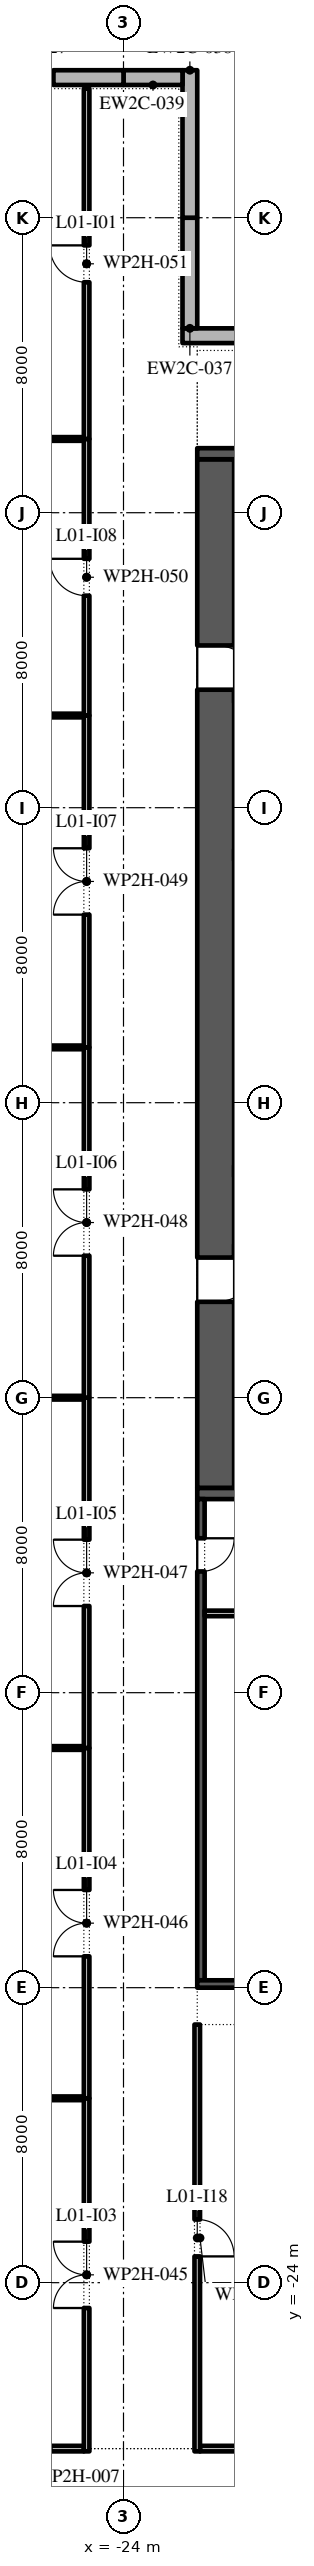
"""IFC4 building model, lengths in metres.
Left out: names, types, materials, properties, quantities, classifications, styles, units other than length and angle.
Written with IfcOpenShell. Run it as: python <this file> out.ifc"""

import sys

from ifc_helpers import new_model, si_unit, direction, frame, frame_2d, origin, place, context, subcontext, project, spatial, polyline, rectangle, outline, extrude, element, fill, save


model = new_model("IFC4")
c1 = context("Model", 3, precision=1e-05, world=origin(), true_north=direction((0.0, 1.0)))
c2 = subcontext(c1, "Body", "Model", "MODEL_VIEW")
j1 = project(units=[si_unit("LENGTHUNIT", "METRE"), si_unit("PLANEANGLEUNIT", "RADIAN")], contexts=[c1])
p1 = place(None, origin())
s1 = spatial("IfcSite", under=j1, at=p1, CompositionType="ELEMENT")
p2 = place(p1, origin())
s2 = spatial("IfcBuilding", under=s1, at=p2, CompositionType="ELEMENT")
p3 = place(p2, frame((0.0, 0.0, 8.0)))
s3 = spatial("IfcBuildingStorey", under=s2, at=p3, CompositionType="ELEMENT", Elevation=8.0)
p4 = place(p3, frame((-16.0, 28.8, 0.0), z_axis=(0.0, 0.0, 1.0), x_axis=(-1.0, 0.0, 0.0)))
e1 = element("IfcWall", 1, at=p4, inside=s3, PredefinedType="STANDARD", context=c2, shape_type="SweptSolid", body=[
    extrude(rectangle(XDim=6.4, YDim=0.4, at=frame_2d((3.2, 0.0))), origin(), (0.0, 0.0, 1.0), 5.7),
])
p5 = place(p3, frame((-22.2, 29.0, 0.0), z_axis=(0.0, 0.0, 1.0), x_axis=(0.0, 1.0, 0.0)))
e2 = element("IfcWall", 2, at=p5, inside=s3, PredefinedType="STANDARD", context=c2, shape_type="SweptSolid", body=[
    extrude(rectangle(XDim=3.0, YDim=0.4, at=frame_2d((1.5, 0.0))), origin(), (0.0, 0.0, 1.0), 5.7),
])
p6 = place(p3, frame((-22.2, 32.0, 0.0), z_axis=(0.0, 0.0, 1.0), x_axis=(0.0, 1.0, 0.0)))
e3 = element("IfcWall", 3, at=p6, inside=s3, PredefinedType="STANDARD", context=c2, shape_type="SweptSolid", body=[
    extrude(rectangle(XDim=4.0, YDim=0.4, at=frame_2d((2.0, 0.0))), origin(), (0.0, 0.0, 1.0), 5.7),
])
p7 = place(p3, frame((-22.4, 35.8, 0.0), z_axis=(0.0, 0.0, 1.0), x_axis=(-1.0, 0.0, 0.0)))
e4 = element("IfcWall", 4, at=p7, inside=s3, PredefinedType="STANDARD", context=c2, shape_type="SweptSolid", body=[
    extrude(rectangle(XDim=1.6, YDim=0.4, at=frame_2d((0.8, 0.0))), origin(), (0.0, 0.0, 1.0), 5.7),
])
p8 = place(p3, frame((-24.0, 35.8, 0.0), z_axis=(0.0, 0.0, 1.0), x_axis=(-1.0, 0.0, 0.0)))
e5 = element("IfcWall", 5, at=p8, inside=s3, PredefinedType="STANDARD", context=c2, shape_type="SweptSolid", body=[
    extrude(rectangle(XDim=8.0, YDim=0.4, at=frame_2d((4.0, 0.0))), origin(), (0.0, 0.0, 1.0), 5.7),
])
p9 = place(p8, frame((1.9, 0.0, 0.9)))
e6 = element("IfcOpeningElement", 6, at=p9, cuts=e5, PredefinedType="OPENING", context=c2, shape_type="SweptSolid", body=[
    extrude(outline(polyline([(0.0, 0.0), (1.8, 0.0), (1.8, 2.641), (1.785, 2.876), (1.739, 3.107), (1.663, 3.33), (1.559, 3.541), (1.428, 3.737), (1.273, 3.914), (1.096, 4.069), (0.9, 4.2), (0.704, 4.069), (0.527, 3.914), (0.372, 3.737), (0.241, 3.541), (0.137, 3.33), (0.061, 3.107), (0.015, 2.876), (0.0, 2.641), (0.0, 0.0)])), frame((0.0, 0.21, 0.0), z_axis=(0.0, -1.0, 0.0), x_axis=(1.0, 0.0, 0.0)), (0.0, 0.0, 1.0), 0.42),
])
p10 = place(p8, frame((4.3, 0.0, 0.9)))
e7 = element("IfcOpeningElement", 7, at=p10, cuts=e5, PredefinedType="OPENING", context=c2, shape_type="SweptSolid", body=[
    extrude(outline(polyline([(0.0, 0.0), (1.8, 0.0), (1.8, 2.641), (1.785, 2.876), (1.739, 3.107), (1.663, 3.33), (1.559, 3.541), (1.428, 3.737), (1.273, 3.914), (1.096, 4.069), (0.9, 4.2), (0.704, 4.069), (0.527, 3.914), (0.372, 3.737), (0.241, 3.541), (0.137, 3.33), (0.061, 3.107), (0.015, 2.876), (0.0, 2.641), (0.0, 0.0)])), frame((0.0, 0.21, 0.0), z_axis=(0.0, -1.0, 0.0), x_axis=(1.0, 0.0, 0.0)), (0.0, 0.0, 1.0), 0.42),
])
p11 = place(p3, frame((-21.5, -2.45, 0.0), z_axis=(0.0, 0.0, 1.0), x_axis=(0.0, 1.0, 0.0)))
e8 = element("IfcWall", 8, at=p11, inside=s3, PredefinedType="SHEAR", context=c2, shape_type="SweptSolid", body=[
    extrude(rectangle(XDim=27.9, YDim=1.0, at=frame_2d((13.95, 0.0))), origin(), (0.0, 0.0, 1.0), 5.7),
])
p12 = place(p11, frame((5.05, 0.0, 0.0)))
e9 = element("IfcOpeningElement", 9, at=p12, cuts=e8, PredefinedType="OPENING", context=c2, shape_type="SweptSolid", body=[
    extrude(rectangle(XDim=1.2, YDim=2.1, at=frame_2d((0.6, 1.05))), frame((0.0, 0.51, 0.0), z_axis=(0.0, -1.0, 0.0), x_axis=(1.0, 0.0, 0.0)), (0.0, 0.0, 1.0), 1.02),
])
p13 = place(p11, frame((21.65, 0.0, 0.0)))
e10 = element("IfcOpeningElement", 10, at=p13, cuts=e8, PredefinedType="OPENING", context=c2, shape_type="SweptSolid", body=[
    extrude(rectangle(XDim=1.2, YDim=2.1, at=frame_2d((0.6, 1.05))), frame((0.0, 0.51, 0.0), z_axis=(0.0, -1.0, 0.0), x_axis=(1.0, 0.0, 0.0)), (0.0, 0.0, 1.0), 1.02),
])
for number, where, z_axis, x_axis in (
    (11, (-22.0, -2.6, 0.0), (0.0, 0.0, 1.0), (1.0, 0.0, 0.0)),
    (12, (-22.0, 25.6, 0.0), (0.0, 0.0, 1.0), (1.0, 0.0, 0.0)),
):
    element("IfcWall", number, at=place(p3, frame(where, z_axis=z_axis, x_axis=x_axis)), inside=s3, PredefinedType="SHEAR", context=c2, shape_type="SweptSolid", body=[
        extrude(rectangle(XDim=12.0, YDim=0.3, at=frame_2d((6.0, 0.0))), origin(), (0.0, 0.0, 1.0), 5.7),
    ])
p14 = place(p3, frame((-21.9, -15.8, 0.0), z_axis=(0.0, 0.0, 1.0), x_axis=(0.0, 1.0, 0.0)))
e13 = element("IfcWall", 13, at=p14, inside=s3, PredefinedType="SHEAR", context=c2, shape_type="SweptSolid", body=[
    extrude(rectangle(XDim=13.05, YDim=0.2, at=frame_2d((6.525, 0.0))), origin(), (0.0, 0.0, 1.0), 5.7),
])
p15 = place(p14, frame((11.087, 0.0, 0.0)))
e14 = element("IfcOpeningElement", 14, at=p15, cuts=e13, PredefinedType="OPENING", context=c2, shape_type="SweptSolid", body=[
    extrude(rectangle(XDim=0.9, YDim=2.1, at=frame_2d((0.45, 1.05))), frame((0.0, 0.11, 0.0), z_axis=(0.0, -1.0, 0.0), x_axis=(1.0, 0.0, 0.0)), (0.0, 0.0, 1.0), 0.22),
])
p16 = place(p3, frame((-22.0, -15.9, 0.0), z_axis=(0.0, 0.0, 1.0), x_axis=(1.0, 0.0, 0.0)))
e15 = element("IfcWall", 15, at=p16, inside=s3, PredefinedType="SHEAR", context=c2, shape_type="SweptSolid", body=[
    extrude(rectangle(XDim=12.0, YDim=0.2, at=frame_2d((6.0, 0.0))), origin(), (0.0, 0.0, 1.0), 5.7),
])
p17 = place(p3, frame((-21.8, -5.85, 0.0), z_axis=(0.0, 0.0, 1.0), x_axis=(1.0, 0.0, 0.0)))
e16 = element("IfcWall", 16, at=p17, inside=s3, PredefinedType="PARTITIONING", context=c2, shape_type="SweptSolid", body=[
    extrude(rectangle(XDim=11.6, YDim=0.15, at=frame_2d((5.8, 0.0))), origin(), (0.0, 0.0, 1.0), 5.7),
])
p18 = place(p3, frame((-27.0, -28.5, 0.0), z_axis=(0.0, 0.0, 1.0), x_axis=(1.0, 0.0, 0.0)))
e17 = element("IfcWall", 17, at=p18, inside=s3, PredefinedType="PARTITIONING", context=c2, shape_type="SweptSolid", body=[
    extrude(rectangle(XDim=1.925, YDim=0.15, at=frame_2d((0.962, 0.0))), origin(), (0.0, 0.0, 1.0), 5.7),
])
p19 = place(p3, frame((-21.925, -28.5, 0.0), z_axis=(0.0, 0.0, 1.0), x_axis=(1.0, 0.0, 0.0)))
e18 = element("IfcWall", 18, at=p19, inside=s3, PredefinedType="PARTITIONING", context=c2, shape_type="SweptSolid", body=[
    extrude(rectangle(XDim=11.525, YDim=0.15, at=frame_2d((5.763, 0.0))), origin(), (0.0, 0.0, 1.0), 5.7),
])
p20 = place(p3, frame((-31.7, -19.0, 0.0), z_axis=(0.0, 0.0, 1.0), x_axis=(1.0, 0.0, 0.0)))
e19 = element("IfcWall", 19, at=p20, inside=s3, PredefinedType="PARTITIONING", context=c2, shape_type="SweptSolid", body=[
    extrude(rectangle(XDim=6.625, YDim=0.1, at=frame_2d((3.312, 0.0))), origin(), (0.0, 0.0, 1.0), 5.7),
])
p21 = place(p3, frame((-41.5, -9.5, 0.0), z_axis=(0.0, 0.0, 1.0), x_axis=(1.0, 0.0, 0.0)))
e20 = element("IfcWall", 20, at=p21, inside=s3, PredefinedType="PARTITIONING", context=c2, shape_type="SweptSolid", body=[
    extrude(rectangle(XDim=16.425, YDim=0.1, at=frame_2d((8.212, 0.0))), origin(), (0.0, 0.0, 1.0), 5.7),
])
p22 = place(p3, frame((-43.5, 0.0, 0.0), z_axis=(0.0, 0.0, 1.0), x_axis=(1.0, 0.0, 0.0)))
e21 = element("IfcWall", 21, at=p22, inside=s3, PredefinedType="PARTITIONING", context=c2, shape_type="SweptSolid", body=[
    extrude(rectangle(XDim=18.425, YDim=0.1, at=frame_2d((9.212, 0.0))), origin(), (0.0, 0.0, 1.0), 5.7),
])
p23 = place(p3, frame((-41.5, 9.5, 0.0), z_axis=(0.0, 0.0, 1.0), x_axis=(1.0, 0.0, 0.0)))
e22 = element("IfcWall", 22, at=p23, inside=s3, PredefinedType="PARTITIONING", context=c2, shape_type="SweptSolid", body=[
    extrude(rectangle(XDim=16.425, YDim=0.1, at=frame_2d((8.212, 0.0))), origin(), (0.0, 0.0, 1.0), 5.7),
])
p24 = place(p3, frame((-43.5, 18.5, 0.0), z_axis=(0.0, 0.0, 1.0), x_axis=(1.0, 0.0, 0.0)))
e23 = element("IfcWall", 23, at=p24, inside=s3, PredefinedType="PARTITIONING", context=c2, shape_type="SweptSolid", body=[
    extrude(rectangle(XDim=18.425, YDim=0.1, at=frame_2d((9.212, 0.0))), origin(), (0.0, 0.0, 1.0), 5.7),
])
p25 = place(p3, frame((-34.0, 26.0, 0.0), z_axis=(0.0, 0.0, 1.0), x_axis=(1.0, 0.0, 0.0)))
e24 = element("IfcWall", 24, at=p25, inside=s3, PredefinedType="PARTITIONING", context=c2, shape_type="SweptSolid", body=[
    extrude(rectangle(XDim=8.925, YDim=0.1, at=frame_2d((4.462, 0.0))), origin(), (0.0, 0.0, 1.0), 5.7),
])
p26 = place(p3, frame((-25.0, -28.575, 0.0), z_axis=(0.0, 0.0, 1.0), x_axis=(0.0, 1.0, 0.0)))
e25 = element("IfcWall", 25, at=p26, inside=s3, PredefinedType="PARTITIONING", context=c2, shape_type="SweptSolid", body=[
    extrude(rectangle(XDim=9.575, YDim=0.15, at=frame_2d((4.788, 0.0))), origin(), (0.0, 0.0, 1.0), 5.7),
])
p27 = place(p26, frame((3.887, 0.0, 0.0)))
e26 = element("IfcOpeningElement", 26, at=p27, cuts=e25, PredefinedType="OPENING", context=c2, shape_type="SweptSolid", body=[
    extrude(rectangle(XDim=1.8, YDim=2.1, at=frame_2d((0.9, 1.05))), frame((0.0, 0.085, 0.0), z_axis=(0.0, -1.0, 0.0), x_axis=(1.0, 0.0, 0.0)), (0.0, 0.0, 1.0), 0.17),
])
p28 = place(p3, frame((-25.0, -19.0, 0.0), z_axis=(0.0, 0.0, 1.0), x_axis=(0.0, 1.0, 0.0)))
e27 = element("IfcWall", 27, at=p28, inside=s3, PredefinedType="PARTITIONING", context=c2, shape_type="SweptSolid", body=[
    extrude(rectangle(XDim=9.5, YDim=0.15, at=frame_2d((4.75, 0.0))), origin(), (0.0, 0.0, 1.0), 5.7),
])
p29 = place(p28, frame((3.85, 0.0, 0.0)))
e28 = element("IfcOpeningElement", 28, at=p29, cuts=e27, PredefinedType="OPENING", context=c2, shape_type="SweptSolid", body=[
    extrude(rectangle(XDim=1.8, YDim=2.1, at=frame_2d((0.9, 1.05))), frame((0.0, 0.085, 0.0), z_axis=(0.0, -1.0, 0.0), x_axis=(1.0, 0.0, 0.0)), (0.0, 0.0, 1.0), 0.17),
])
p30 = place(p3, frame((-25.0, -9.5, 0.0), z_axis=(0.0, 0.0, 1.0), x_axis=(0.0, 1.0, 0.0)))
e29 = element("IfcWall", 29, at=p30, inside=s3, PredefinedType="PARTITIONING", context=c2, shape_type="SweptSolid", body=[
    extrude(rectangle(XDim=9.5, YDim=0.15, at=frame_2d((4.75, 0.0))), origin(), (0.0, 0.0, 1.0), 5.7),
])
p31 = place(p30, frame((3.85, 0.0, 0.0)))
e30 = element("IfcOpeningElement", 30, at=p31, cuts=e29, PredefinedType="OPENING", context=c2, shape_type="SweptSolid", body=[
    extrude(rectangle(XDim=1.8, YDim=2.1, at=frame_2d((0.9, 1.05))), frame((0.0, 0.085, 0.0), z_axis=(0.0, -1.0, 0.0), x_axis=(1.0, 0.0, 0.0)), (0.0, 0.0, 1.0), 0.17),
])
p32 = place(p3, frame((-25.0, 0.0, 0.0), z_axis=(0.0, 0.0, 1.0), x_axis=(0.0, 1.0, 0.0)))
e31 = element("IfcWall", 31, at=p32, inside=s3, PredefinedType="PARTITIONING", context=c2, shape_type="SweptSolid", body=[
    extrude(rectangle(XDim=9.5, YDim=0.15, at=frame_2d((4.75, 0.0))), origin(), (0.0, 0.0, 1.0), 5.7),
])
p33 = place(p32, frame((3.85, 0.0, 0.0)))
e32 = element("IfcOpeningElement", 32, at=p33, cuts=e31, PredefinedType="OPENING", context=c2, shape_type="SweptSolid", body=[
    extrude(rectangle(XDim=1.8, YDim=2.1, at=frame_2d((0.9, 1.05))), frame((0.0, 0.085, 0.0), z_axis=(0.0, -1.0, 0.0), x_axis=(1.0, 0.0, 0.0)), (0.0, 0.0, 1.0), 0.17),
])
p34 = place(p3, frame((-25.0, 9.5, 0.0), z_axis=(0.0, 0.0, 1.0), x_axis=(0.0, 1.0, 0.0)))
e33 = element("IfcWall", 33, at=p34, inside=s3, PredefinedType="PARTITIONING", context=c2, shape_type="SweptSolid", body=[
    extrude(rectangle(XDim=9.0, YDim=0.15, at=frame_2d((4.5, 0.0))), origin(), (0.0, 0.0, 1.0), 5.7),
])
p35 = place(p34, frame((3.6, 0.0, 0.0)))
e34 = element("IfcOpeningElement", 34, at=p35, cuts=e33, PredefinedType="OPENING", context=c2, shape_type="SweptSolid", body=[
    extrude(rectangle(XDim=1.8, YDim=2.1, at=frame_2d((0.9, 1.05))), frame((0.0, 0.085, 0.0), z_axis=(0.0, -1.0, 0.0), x_axis=(1.0, 0.0, 0.0)), (0.0, 0.0, 1.0), 0.17),
])
p36 = place(p3, frame((-25.0, 18.5, 0.0), z_axis=(0.0, 0.0, 1.0), x_axis=(0.0, 1.0, 0.0)))
e35 = element("IfcWall", 35, at=p36, inside=s3, PredefinedType="PARTITIONING", context=c2, shape_type="SweptSolid", body=[
    extrude(rectangle(XDim=7.5, YDim=0.15, at=frame_2d((3.75, 0.0))), origin(), (0.0, 0.0, 1.0), 5.7),
])
p37 = place(p36, frame((3.25, 0.0, 0.0)))
e36 = element("IfcOpeningElement", 36, at=p37, cuts=e35, PredefinedType="OPENING", context=c2, shape_type="SweptSolid", body=[
    extrude(rectangle(XDim=1.0, YDim=2.1, at=frame_2d((0.5, 1.05))), frame((0.0, 0.085, 0.0), z_axis=(0.0, -1.0, 0.0), x_axis=(1.0, 0.0, 0.0)), (0.0, 0.0, 1.0), 0.17),
])
p38 = place(p3, frame((-25.0, 26.0, 0.0), z_axis=(0.0, 0.0, 1.0), x_axis=(0.0, 1.0, 0.0)))
e37 = element("IfcWall", 37, at=p38, inside=s3, PredefinedType="PARTITIONING", context=c2, shape_type="SweptSolid", body=[
    extrude(rectangle(XDim=9.5, YDim=0.15, at=frame_2d((4.75, 0.0))), origin(), (0.0, 0.0, 1.0), 5.7),
])
p39 = place(p38, frame((4.25, 0.0, 0.0)))
e38 = element("IfcOpeningElement", 38, at=p39, cuts=e37, PredefinedType="OPENING", context=c2, shape_type="SweptSolid", body=[
    extrude(rectangle(XDim=1.0, YDim=2.1, at=frame_2d((0.5, 1.05))), frame((0.0, 0.085, 0.0), z_axis=(0.0, -1.0, 0.0), x_axis=(1.0, 0.0, 0.0)), (0.0, 0.0, 1.0), 0.17),
])
p40 = place(p3, frame((-22.0, -28.575, 0.0), z_axis=(0.0, 0.0, 1.0), x_axis=(0.0, 1.0, 0.0)))
e39 = element("IfcWall", 39, at=p40, inside=s3, PredefinedType="PARTITIONING", context=c2, shape_type="SweptSolid", body=[
    extrude(rectangle(XDim=11.575, YDim=0.15, at=frame_2d((5.788, 0.0))), origin(), (0.0, 0.0, 1.0), 5.7),
])
p41 = place(p40, frame((5.288, 0.0, 0.0)))
e40 = element("IfcOpeningElement", 40, at=p41, cuts=e39, PredefinedType="OPENING", context=c2, shape_type="SweptSolid", body=[
    extrude(rectangle(XDim=1.0, YDim=2.1, at=frame_2d((0.5, 1.05))), frame((0.0, 0.085, 0.0), z_axis=(0.0, -1.0, 0.0), x_axis=(1.0, 0.0, 0.0)), (0.0, 0.0, 1.0), 0.17),
])
p42 = place(p9, origin())
e41 = element("IfcWindow", 41, at=p42, inside=s3, PartitioningType="DOUBLE_PANEL_VERTICAL", PredefinedType="WINDOW", context=c2, shape_type="SweptSolid", body=[
    extrude(outline(polyline([(0.0, 0.0), (1.8, 0.0), (1.8, 2.641), (1.785, 2.876), (1.739, 3.107), (1.663, 3.33), (1.559, 3.541), (1.428, 3.737), (1.273, 3.914), (1.096, 4.069), (0.9, 4.2), (0.704, 4.069), (0.527, 3.914), (0.372, 3.737), (0.241, 3.541), (0.137, 3.33), (0.061, 3.107), (0.015, 2.876), (0.0, 2.641), (0.0, 0.0)])), frame((0.0, 0.03, 0.0), z_axis=(0.0, -1.0, 0.0), x_axis=(1.0, 0.0, 0.0)), (0.0, 0.0, 1.0), 0.06),
])
fill(e6, e41)
p43 = place(p12, frame((1.2, 0.0, 0.0), z_axis=(0.0, 0.0, 1.0), x_axis=(-1.0, 0.0, 0.0)))
e42 = element("IfcDoor", 42, at=p43, inside=s3, OperationType="SINGLE_SWING_RIGHT", PredefinedType="DOOR", context=c2, shape_type="SweptSolid", body=[
    extrude(rectangle(XDim=1.2, YDim=2.1, at=frame_2d((0.6, 1.05))), frame((0.0, 0.025, 0.0), z_axis=(0.0, -1.0, 0.0), x_axis=(1.0, 0.0, 0.0)), (0.0, 0.0, 1.0), 0.05),
])
fill(e9, e42)
p44 = place(p13, frame((1.2, 0.0, 0.0), z_axis=(0.0, 0.0, 1.0), x_axis=(-1.0, 0.0, 0.0)))
e43 = element("IfcDoor", 43, at=p44, inside=s3, OperationType="SINGLE_SWING_LEFT", PredefinedType="DOOR", context=c2, shape_type="SweptSolid", body=[
    extrude(rectangle(XDim=1.2, YDim=2.1, at=frame_2d((0.6, 1.05))), frame((0.0, 0.025, 0.0), z_axis=(0.0, -1.0, 0.0), x_axis=(1.0, 0.0, 0.0)), (0.0, 0.0, 1.0), 0.05),
])
fill(e10, e43)
p45 = place(p15, frame((0.9, -0.15, 0.0), z_axis=(0.0, 0.0, 1.0), x_axis=(-1.0, 0.0, 0.0)))
e44 = element("IfcDoor", 44, at=p45, inside=s3, OperationType="SINGLE_SWING_RIGHT", PredefinedType="DOOR", context=c2, shape_type="SweptSolid", body=[
    extrude(rectangle(XDim=0.9, YDim=2.1, at=frame_2d((0.45, 1.05))), frame((0.0, -0.05, 0.0), z_axis=(0.0, -1.0, 0.0), x_axis=(1.0, 0.0, 0.0)), (0.0, 0.0, 1.0), 0.05),
])
fill(e14, e44)
p46 = place(p39, origin())
e45 = element("IfcDoor", 45, at=p46, inside=s3, OperationType="SINGLE_SWING_LEFT", PredefinedType="DOOR", context=c2, shape_type="SweptSolid", body=[
    extrude(rectangle(XDim=1.0, YDim=2.1, at=frame_2d((0.5, 1.05))), frame((0.0, 0.025, 0.0), z_axis=(0.0, -1.0, 0.0), x_axis=(1.0, 0.0, 0.0)), (0.0, 0.0, 1.0), 0.05),
])
fill(e38, e45)
p47 = place(p27, origin())
e46 = element("IfcDoor", 46, at=p47, inside=s3, OperationType="SINGLE_SWING_LEFT", PredefinedType="DOOR", context=c2, shape_type="SweptSolid", body=[
    extrude(rectangle(XDim=1.8, YDim=2.1, at=frame_2d((0.9, 1.05))), frame((0.0, 0.025, 0.0), z_axis=(0.0, -1.0, 0.0), x_axis=(1.0, 0.0, 0.0)), (0.0, 0.0, 1.0), 0.05),
])
fill(e26, e46)
p48 = place(p29, origin())
e47 = element("IfcDoor", 47, at=p48, inside=s3, OperationType="SINGLE_SWING_RIGHT", PredefinedType="DOOR", context=c2, shape_type="SweptSolid", body=[
    extrude(rectangle(XDim=1.8, YDim=2.1, at=frame_2d((0.9, 1.05))), frame((0.0, 0.025, 0.0), z_axis=(0.0, -1.0, 0.0), x_axis=(1.0, 0.0, 0.0)), (0.0, 0.0, 1.0), 0.05),
])
fill(e28, e47)
p49 = place(p31, origin())
e48 = element("IfcDoor", 48, at=p49, inside=s3, OperationType="SINGLE_SWING_RIGHT", PredefinedType="DOOR", context=c2, shape_type="SweptSolid", body=[
    extrude(rectangle(XDim=1.8, YDim=2.1, at=frame_2d((0.9, 1.05))), frame((0.0, 0.025, 0.0), z_axis=(0.0, -1.0, 0.0), x_axis=(1.0, 0.0, 0.0)), (0.0, 0.0, 1.0), 0.05),
])
fill(e30, e48)
p50 = place(p33, origin())
e49 = element("IfcDoor", 49, at=p50, inside=s3, OperationType="SINGLE_SWING_RIGHT", PredefinedType="DOOR", context=c2, shape_type="SweptSolid", body=[
    extrude(rectangle(XDim=1.8, YDim=2.1, at=frame_2d((0.9, 1.05))), frame((0.0, 0.025, 0.0), z_axis=(0.0, -1.0, 0.0), x_axis=(1.0, 0.0, 0.0)), (0.0, 0.0, 1.0), 0.05),
])
fill(e32, e49)
p51 = place(p35, origin())
e50 = element("IfcDoor", 50, at=p51, inside=s3, OperationType="SINGLE_SWING_RIGHT", PredefinedType="DOOR", context=c2, shape_type="SweptSolid", body=[
    extrude(rectangle(XDim=1.8, YDim=2.1, at=frame_2d((0.9, 1.05))), frame((0.0, 0.025, 0.0), z_axis=(0.0, -1.0, 0.0), x_axis=(1.0, 0.0, 0.0)), (0.0, 0.0, 1.0), 0.05),
])
fill(e34, e50)
p52 = place(p37, origin())
e51 = element("IfcDoor", 51, at=p52, inside=s3, OperationType="SINGLE_SWING_LEFT", PredefinedType="DOOR", context=c2, shape_type="SweptSolid", body=[
    extrude(rectangle(XDim=1.0, YDim=2.1, at=frame_2d((0.5, 1.05))), frame((0.0, 0.025, 0.0), z_axis=(0.0, -1.0, 0.0), x_axis=(1.0, 0.0, 0.0)), (0.0, 0.0, 1.0), 0.05),
])
fill(e36, e51)
p53 = place(p41, frame((1.0, 0.0, 0.0), z_axis=(0.0, 0.0, 1.0), x_axis=(-1.0, 0.0, 0.0)))
e52 = element("IfcDoor", 52, at=p53, inside=s3, OperationType="SINGLE_SWING_LEFT", PredefinedType="DOOR", context=c2, shape_type="SweptSolid", body=[
    extrude(rectangle(XDim=1.0, YDim=2.1, at=frame_2d((0.5, 1.05))), frame((0.0, 0.025, 0.0), z_axis=(0.0, -1.0, 0.0), x_axis=(1.0, 0.0, 0.0)), (0.0, 0.0, 1.0), 0.05),
])
fill(e40, e52)
save(model, sys.argv[1])
